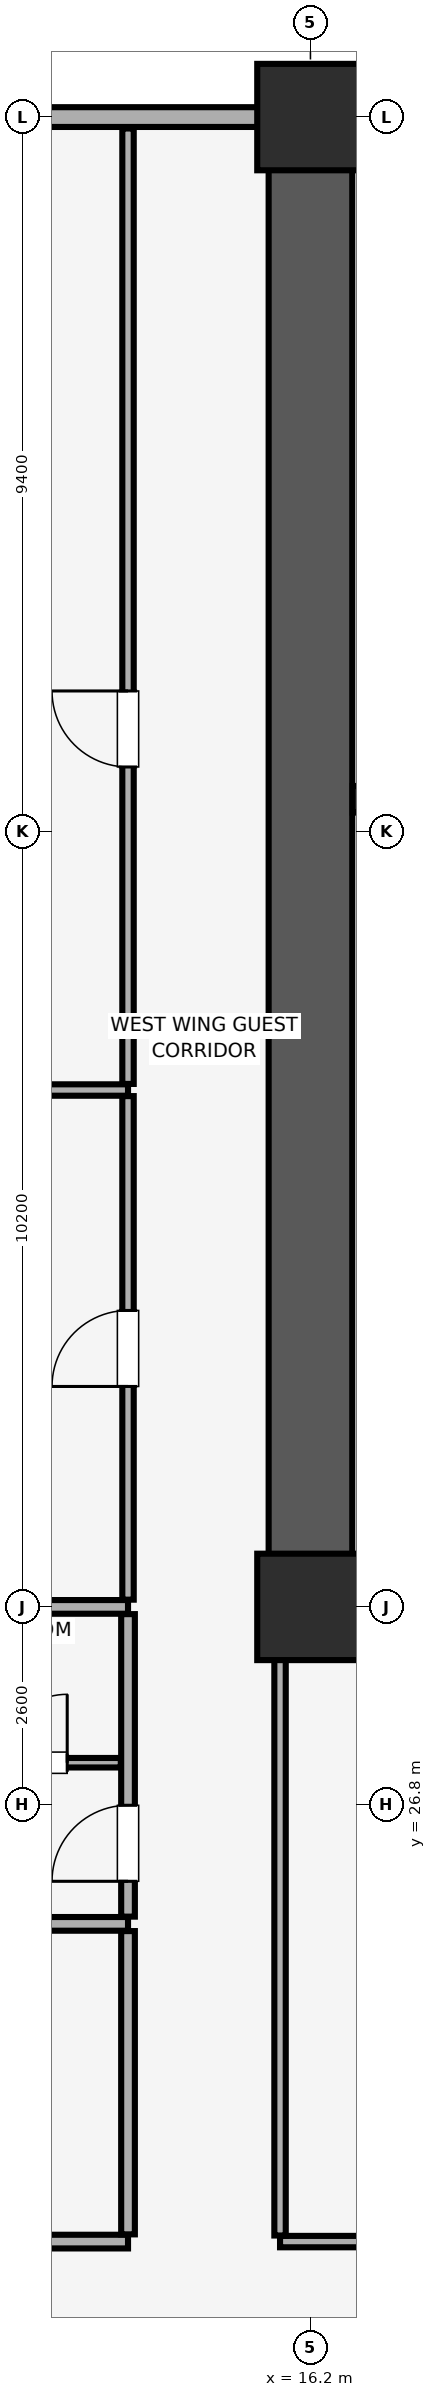
"""IFC4 building model, lengths in metres.
Left out: names, types, materials, properties, quantities, classifications, styles, units other than length and angle.
Written with IfcOpenShell. Run it as: python <this file> out.ifc"""

import sys

from ifc_helpers import new_model, si_unit, direction, frame, frame_2d, origin, origin_2d, place, context, subcontext, project, spatial, rectangle, extrude, element, fill, save


model = new_model("IFC4")
c1 = context("Model", 3, precision=1e-05, world=origin(), true_north=direction((0.0, 1.0)))
c2 = subcontext(c1, "Body", "Model", "MODEL_VIEW")
j1 = project(units=[si_unit("LENGTHUNIT", "METRE"), si_unit("PLANEANGLEUNIT", "RADIAN")], contexts=[c1])
p1 = place(None, origin())
s1 = spatial("IfcSite", under=j1, at=p1, CompositionType="ELEMENT")
p2 = place(p1, origin())
s2 = spatial("IfcBuilding", under=s1, at=p2, CompositionType="ELEMENT")
p3 = place(p2, frame((0.0, 0.0, 72.65)))
s3 = spatial("IfcBuildingStorey", under=s2, at=p3, CompositionType="ELEMENT", Elevation=72.65)
for number, where, z_axis, x_axis in (
    (1, (16.2, 29.4, 0.0), (0.0, 0.0, 1.0), (1.0, 0.0, 0.0)),
    (2, (16.2, 49.0, 0.0), (0.0, 0.0, 1.0), (1.0, 0.0, 0.0)),
):
    element("IfcColumn", number, at=place(p3, frame(where, z_axis=z_axis, x_axis=x_axis)), inside=s3, PredefinedType="COLUMN", context=c2, shape_type="SweptSolid", body=[
        extrude(rectangle(XDim=1.4, YDim=1.4, at=origin_2d()), origin(), (0.0, 0.0, 1.0), 3.51),
    ])
p4 = place(p3, frame((79.8, 49.0, 0.0), z_axis=(0.0, 0.0, 1.0), x_axis=(-1.0, 0.0, 0.0)))
e3 = element("IfcWall", 3, at=p4, inside=s3, PredefinedType="SOLIDWALL", context=c2, shape_type="SweptSolid", body=[
    extrude(rectangle(XDim=75.6, YDim=0.26, at=frame_2d((37.8, 0.0))), origin(), (0.0, 0.0, 1.0), 2.56),
])
p5 = place(p4, frame((72.565, 0.0, 0.85)))
e4 = element("IfcOpeningElement", 4, at=p5, cuts=e3, PredefinedType="OPENING", context=c2, shape_type="SweptSolid", body=[
    extrude(rectangle(XDim=1.5, YDim=1.4, at=frame_2d((0.75, 0.7))), frame((0.0, 0.14, 0.0), z_axis=(0.0, -1.0, 0.0), x_axis=(1.0, 0.0, 0.0)), (0.0, 0.0, 1.0), 0.28),
])
p6 = place(p4, frame((67.45, 0.0, 0.85)))
e5 = element("IfcOpeningElement", 5, at=p6, cuts=e3, PredefinedType="OPENING", context=c2, shape_type="SweptSolid", body=[
    extrude(rectangle(XDim=1.5, YDim=1.4, at=frame_2d((0.75, 0.7))), frame((0.0, 0.14, 0.0), z_axis=(0.0, -1.0, 0.0), x_axis=(1.0, 0.0, 0.0)), (0.0, 0.0, 1.0), 0.28),
])
p7 = place(p4, frame((6.65, 0.0, 0.85)))
e6 = element("IfcOpeningElement", 6, at=p7, cuts=e3, PredefinedType="OPENING", context=c2, shape_type="SweptSolid", body=[
    extrude(rectangle(XDim=1.5, YDim=1.4, at=frame_2d((0.75, 0.7))), frame((0.0, 0.14, 0.0), z_axis=(0.0, -1.0, 0.0), x_axis=(1.0, 0.0, 0.0)), (0.0, 0.0, 1.0), 0.28),
])
p8 = place(p4, frame((1.535, 0.0, 0.85)))
e7 = element("IfcOpeningElement", 7, at=p8, cuts=e3, PredefinedType="OPENING", context=c2, shape_type="SweptSolid", body=[
    extrude(rectangle(XDim=1.5, YDim=1.4, at=frame_2d((0.75, 0.7))), frame((0.0, 0.14, 0.0), z_axis=(0.0, -1.0, 0.0), x_axis=(1.0, 0.0, 0.0)), (0.0, 0.0, 1.0), 0.28),
])
p9 = place(p4, frame((51.365, 0.0, 0.9)))
e8 = element("IfcOpeningElement", 8, at=p9, cuts=e3, PredefinedType="OPENING", context=c2, shape_type="SweptSolid", body=[
    extrude(rectangle(XDim=1.5, YDim=1.4, at=frame_2d((0.75, 0.7))), frame((0.0, 0.14, 0.0), z_axis=(0.0, -1.0, 0.0), x_axis=(1.0, 0.0, 0.0)), (0.0, 0.0, 1.0), 0.28),
])
p10 = place(p4, frame((44.55, 0.0, 0.9)))
e9 = element("IfcOpeningElement", 9, at=p10, cuts=e3, PredefinedType="OPENING", context=c2, shape_type="SweptSolid", body=[
    extrude(rectangle(XDim=1.5, YDim=1.4, at=frame_2d((0.75, 0.7))), frame((0.0, 0.14, 0.0), z_axis=(0.0, -1.0, 0.0), x_axis=(1.0, 0.0, 0.0)), (0.0, 0.0, 1.0), 0.28),
])
p11 = place(p4, frame((28.1, 0.0, 0.9)))
e10 = element("IfcOpeningElement", 10, at=p11, cuts=e3, PredefinedType="OPENING", context=c2, shape_type="SweptSolid", body=[
    extrude(rectangle(XDim=1.5, YDim=1.4, at=frame_2d((0.75, 0.7))), frame((0.0, 0.14, 0.0), z_axis=(0.0, -1.0, 0.0), x_axis=(1.0, 0.0, 0.0)), (0.0, 0.0, 1.0), 0.28),
])
p12 = place(p4, frame((23.485, 0.0, 0.9)))
e11 = element("IfcOpeningElement", 11, at=p12, cuts=e3, PredefinedType="OPENING", context=c2, shape_type="SweptSolid", body=[
    extrude(rectangle(XDim=1.5, YDim=1.4, at=frame_2d((0.75, 0.7))), frame((0.0, 0.14, 0.0), z_axis=(0.0, -1.0, 0.0), x_axis=(1.0, 0.0, 0.0)), (0.0, 0.0, 1.0), 0.28),
])
p13 = place(p3, frame((16.2, 29.4, 0.0), z_axis=(0.0, 0.0, 1.0), x_axis=(0.0, 1.0, 0.0)))
e12 = element("IfcWall", 12, at=p13, inside=s3, PredefinedType="SHEAR", context=c2, shape_type="SweptSolid", body=[
    extrude(rectangle(XDim=19.2, YDim=1.1, at=frame_2d((9.6, 0.0))), origin(), (0.0, 0.0, 1.0), 3.51),
])
p14 = place(p3, frame((16.755, 29.4, 0.0), z_axis=(0.0, 0.0, 1.0), x_axis=(1.0, 0.0, 0.0)))
e13 = element("IfcWall", 13, at=p14, inside=s3, PredefinedType="SHEAR", context=c2, shape_type="SweptSolid", body=[
    extrude(rectangle(XDim=6.845, YDim=1.1, at=frame_2d((3.423, 0.0))), origin(), (0.0, 0.0, 1.0), 3.51),
])
p15 = place(p3, frame((16.755, 40.025, 0.0), z_axis=(0.0, 0.0, 1.0), x_axis=(1.0, 0.0, 0.0)))
e14 = element("IfcWall", 14, at=p15, inside=s3, PredefinedType="SHEAR", context=c2, shape_type="SweptSolid", body=[
    extrude(rectangle(XDim=4.1, YDim=0.35, at=frame_2d((2.05, 0.0))), origin(), (0.0, 0.0, 1.0), 3.51),
])
p16 = place(p15, frame((1.71, 0.0, 0.0)))
e15 = element("IfcOpeningElement", 15, at=p16, cuts=e14, PredefinedType="OPENING", context=c2, shape_type="SweptSolid", body=[
    extrude(rectangle(XDim=1.15, YDim=2.15, at=frame_2d((0.575, 1.075))), frame((0.0, 0.185, 0.0), z_axis=(0.0, -1.0, 0.0), x_axis=(1.0, 0.0, 0.0)), (0.0, 0.0, 1.0), 0.37),
])
p17 = place(p3, frame((15.8, 21.05, 0.0), z_axis=(0.0, 0.0, 1.0), x_axis=(1.0, 0.0, 0.0)))
e16 = element("IfcWall", 16, at=p17, inside=s3, PredefinedType="PARTITIONING", context=c2, shape_type="SweptSolid", body=[
    extrude(rectangle(XDim=9.4, YDim=0.15, at=frame_2d((4.7, 0.0))), origin(), (0.0, 0.0, 1.0), 3.51),
])
p18 = place(p17, frame((4.2, 0.0, 0.0)))
e17 = element("IfcOpeningElement", 17, at=p18, cuts=e16, PredefinedType="OPENING", context=c2, shape_type="SweptSolid", body=[
    extrude(rectangle(XDim=1.0, YDim=2.15, at=frame_2d((0.5, 1.075))), frame((0.0, 0.085, 0.0), z_axis=(0.0, -1.0, 0.0), x_axis=(1.0, 0.0, 0.0)), (0.0, 0.0, 1.0), 0.17),
])
p19 = place(p3, frame((15.8, 21.13, 0.0), z_axis=(0.0, 0.0, 1.0), x_axis=(0.0, 1.0, 0.0)))
e18 = element("IfcWall", 18, at=p19, inside=s3, PredefinedType="PARTITIONING", context=c2, shape_type="SweptSolid", body=[
    extrude(rectangle(XDim=8.26, YDim=0.15, at=frame_2d((4.13, 0.0))), origin(), (0.0, 0.0, 1.0), 3.51),
])
p20 = place(p3, frame((0.15, 21.05, 0.0), z_axis=(0.0, 0.0, 1.0), x_axis=(1.0, 0.0, 0.0)))
e19 = element("IfcWall", 19, at=p20, inside=s3, PredefinedType="PARTITIONING", context=c2, shape_type="SweptSolid", body=[
    extrude(rectangle(XDim=13.65, YDim=0.18, at=frame_2d((6.825, 0.0))), origin(), (0.0, 0.0, 1.0), 3.51),
])
p21 = place(p20, frame((11.14, 0.0, 0.0)))
e20 = element("IfcOpeningElement", 20, at=p21, cuts=e19, PredefinedType="OPENING", context=c2, shape_type="SweptSolid", body=[
    extrude(rectangle(XDim=1.0, YDim=2.15, at=frame_2d((0.5, 1.075))), frame((0.0, 0.1, 0.0), z_axis=(0.0, -1.0, 0.0), x_axis=(1.0, 0.0, 0.0)), (0.0, 0.0, 1.0), 0.2),
])
p22 = place(p3, frame((0.15, 25.23, 0.0), z_axis=(0.0, 0.0, 1.0), x_axis=(1.0, 0.0, 0.0)))
e21 = element("IfcWall", 21, at=p22, inside=s3, PredefinedType="PARTITIONING", context=c2, shape_type="SweptSolid", body=[
    extrude(rectangle(XDim=13.65, YDim=0.18, at=frame_2d((6.825, 0.0))), origin(), (0.0, 0.0, 1.0), 3.51),
])
p23 = place(p3, frame((13.8, 21.145, 0.0), z_axis=(0.0, 0.0, 1.0), x_axis=(0.0, 1.0, 0.0)))
e22 = element("IfcWall", 22, at=p23, inside=s3, PredefinedType="PARTITIONING", context=c2, shape_type="SweptSolid", body=[
    extrude(rectangle(XDim=3.99, YDim=0.18, at=frame_2d((1.995, 0.0))), origin(), (0.0, 0.0, 1.0), 3.51),
])
p24 = place(p3, frame((0.15, 29.4, 0.0), z_axis=(0.0, 0.0, 1.0), x_axis=(1.0, 0.0, 0.0)))
e23 = element("IfcWall", 23, at=p24, inside=s3, PredefinedType="PARTITIONING", context=c2, shape_type="SweptSolid", body=[
    extrude(rectangle(XDim=13.65, YDim=0.18, at=frame_2d((6.825, 0.0))), origin(), (0.0, 0.0, 1.0), 2.86),
])
p25 = place(p3, frame((13.8, 25.325, 0.0), z_axis=(0.0, 0.0, 1.0), x_axis=(0.0, 1.0, 0.0)))
e24 = element("IfcWall", 24, at=p25, inside=s3, PredefinedType="PARTITIONING", context=c2, shape_type="SweptSolid", body=[
    extrude(rectangle(XDim=3.98, YDim=0.18, at=frame_2d((1.99, 0.0))), origin(), (0.0, 0.0, 1.0), 3.51),
])
p26 = place(p25, frame((0.465, 0.0, 0.0)))
e25 = element("IfcOpeningElement", 25, at=p26, cuts=e24, PredefinedType="OPENING", context=c2, shape_type="SweptSolid", body=[
    extrude(rectangle(XDim=1.0, YDim=2.15, at=frame_2d((0.5, 1.075))), frame((0.0, 0.1, 0.0), z_axis=(0.0, -1.0, 0.0), x_axis=(1.0, 0.0, 0.0)), (0.0, 0.0, 1.0), 0.2),
])
p27 = place(p3, frame((11.3, 27.35, 0.0), z_axis=(0.0, 0.0, 1.0), x_axis=(1.0, 0.0, 0.0)))
e26 = element("IfcWall", 26, at=p27, inside=s3, PredefinedType="PARTITIONING", context=c2, shape_type="SweptSolid", body=[
    extrude(rectangle(XDim=2.405, YDim=0.125, at=frame_2d((1.203, 0.0))), origin(), (0.0, 0.0, 1.0), 3.51),
])
p28 = place(p27, frame((0.8, 0.0, 0.0)))
e27 = element("IfcOpeningElement", 27, at=p28, cuts=e26, PredefinedType="OPENING", context=c2, shape_type="SweptSolid", body=[
    extrude(rectangle(XDim=0.9, YDim=2.1, at=frame_2d((0.45, 1.05))), frame((0.0, 0.073, 0.0), z_axis=(0.0, -1.0, 0.0), x_axis=(1.0, 0.0, 0.0)), (0.0, 0.0, 1.0), 0.145),
])
p29 = place(p3, frame((0.15, 36.2, 0.0), z_axis=(0.0, 0.0, 1.0), x_axis=(1.0, 0.0, 0.0)))
e28 = element("IfcWall", 28, at=p29, inside=s3, PredefinedType="PARTITIONING", context=c2, shape_type="SweptSolid", body=[
    extrude(rectangle(XDim=13.65, YDim=0.15, at=frame_2d((6.825, 0.0))), origin(), (0.0, 0.0, 1.0), 3.51),
])
p30 = place(p3, frame((13.8, 29.495, 0.0), z_axis=(0.0, 0.0, 1.0), x_axis=(0.0, 1.0, 0.0)))
e29 = element("IfcWall", 29, at=p30, inside=s3, PredefinedType="PARTITIONING", context=c2, shape_type="SweptSolid", body=[
    extrude(rectangle(XDim=6.625, YDim=0.15, at=frame_2d((3.312, 0.0))), origin(), (0.0, 0.0, 1.0), 3.51),
])
p31 = place(p30, frame((2.805, 0.0, 0.0)))
e30 = element("IfcOpeningElement", 30, at=p31, cuts=e29, PredefinedType="OPENING", context=c2, shape_type="SweptSolid", body=[
    extrude(rectangle(XDim=1.0, YDim=2.15, at=frame_2d((0.5, 1.075))), frame((0.0, 0.085, 0.0), z_axis=(0.0, -1.0, 0.0), x_axis=(1.0, 0.0, 0.0)), (0.0, 0.0, 1.0), 0.17),
])
p32 = place(p3, frame((13.8, 36.28, 0.0), z_axis=(0.0, 0.0, 1.0), x_axis=(0.0, 1.0, 0.0)))
e31 = element("IfcWall", 31, at=p32, inside=s3, PredefinedType="PARTITIONING", context=c2, shape_type="SweptSolid", body=[
    extrude(rectangle(XDim=12.57, YDim=0.15, at=frame_2d((6.285, 0.0))), origin(), (0.0, 0.0, 1.0), 3.51),
])
p33 = place(p32, frame((4.17, 0.0, 0.0)))
e32 = element("IfcOpeningElement", 32, at=p33, cuts=e31, PredefinedType="OPENING", context=c2, shape_type="SweptSolid", body=[
    extrude(rectangle(XDim=1.0, YDim=2.15, at=frame_2d((0.5, 1.075))), frame((0.0, 0.085, 0.0), z_axis=(0.0, -1.0, 0.0), x_axis=(1.0, 0.0, 0.0)), (0.0, 0.0, 1.0), 0.17),
])
p34 = place(p26, origin())
e33 = element("IfcDoor", 33, at=p34, inside=s3, OperationType="SINGLE_SWING_LEFT", PredefinedType="DOOR", context=c2, shape_type="SweptSolid", body=[
    extrude(rectangle(XDim=1.0, YDim=2.15, at=frame_2d((0.5, 1.075))), frame((0.0, 0.025, 0.0), z_axis=(0.0, -1.0, 0.0), x_axis=(1.0, 0.0, 0.0)), (0.0, 0.0, 1.0), 0.05),
])
fill(e25, e33)
p35 = place(p28, origin())
e34 = element("IfcDoor", 34, at=p35, inside=s3, OperationType="SINGLE_SWING_RIGHT", PredefinedType="DOOR", context=c2, shape_type="SweptSolid", body=[
    extrude(rectangle(XDim=0.9, YDim=2.1, at=frame_2d((0.45, 1.05))), frame((0.0, 0.025, 0.0), z_axis=(0.0, -1.0, 0.0), x_axis=(1.0, 0.0, 0.0)), (0.0, 0.0, 1.0), 0.05),
])
fill(e27, e34)
p36 = place(p31, origin())
e35 = element("IfcDoor", 35, at=p36, inside=s3, OperationType="SINGLE_SWING_LEFT", PredefinedType="DOOR", context=c2, shape_type="SweptSolid", body=[
    extrude(rectangle(XDim=1.0, YDim=2.15, at=frame_2d((0.5, 1.075))), frame((0.0, 0.025, 0.0), z_axis=(0.0, -1.0, 0.0), x_axis=(1.0, 0.0, 0.0)), (0.0, 0.0, 1.0), 0.05),
])
fill(e30, e35)
p37 = place(p33, origin())
e36 = element("IfcDoor", 36, at=p37, inside=s3, OperationType="SINGLE_SWING_RIGHT", PredefinedType="DOOR", context=c2, shape_type="SweptSolid", body=[
    extrude(rectangle(XDim=1.0, YDim=2.15, at=frame_2d((0.5, 1.075))), frame((0.0, 0.025, 0.0), z_axis=(0.0, -1.0, 0.0), x_axis=(1.0, 0.0, 0.0)), (0.0, 0.0, 1.0), 0.05),
])
fill(e32, e36)
save(model, sys.argv[1])
